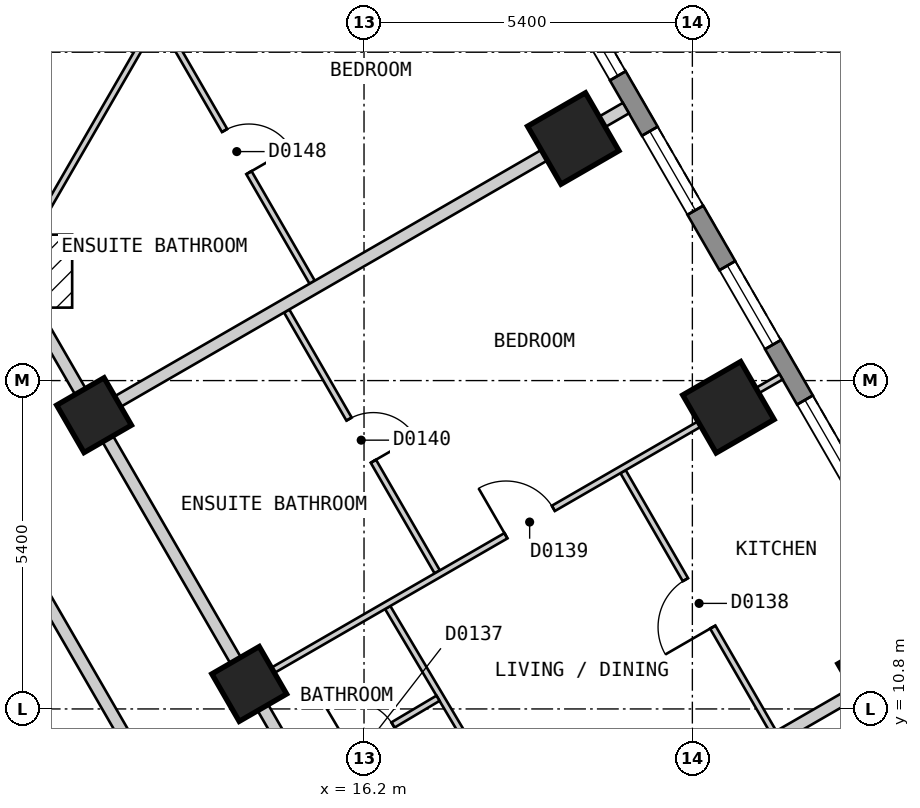
"""IFC4 building model, lengths in metres.
Left out: names, types, materials, properties, quantities, classifications, styles, units other than length and angle.
Written with IfcOpenShell. Run it as: python <this file> out.ifc"""

import sys

from ifc_helpers import new_model, si_unit, direction, frame, frame_2d, origin, origin_2d, place, context, subcontext, project, spatial, polyline, rectangle, outline, extrude, element, fill, save


model = new_model("IFC4")
c1 = context("Model", 3, precision=1e-05, world=origin(), true_north=direction((0.0, 1.0)))
c2 = subcontext(c1, "Body", "Model", "MODEL_VIEW")
j1 = project(units=[si_unit("LENGTHUNIT", "METRE"), si_unit("PLANEANGLEUNIT", "RADIAN")], contexts=[c1])
p1 = place(None, origin())
s1 = spatial("IfcSite", under=j1, at=p1, CompositionType="ELEMENT")
p2 = place(p1, origin())
s2 = spatial("IfcBuilding", under=s1, at=p2, CompositionType="ELEMENT")
p3 = place(p2, frame((0.0, 0.0, 23.4)))
s3 = spatial("IfcBuildingStorey", under=s2, at=p3, CompositionType="ELEMENT", Elevation=23.4)
for number, where, z_axis, x_axis in (
    (1, (24.745, 11.341, 0.0), (0.0, 0.0, 1.0), (-0.5, 0.866, 0.0)),
    (2, (22.193, 15.761, 0.0), (0.0, 0.0, 1.0), (-0.5, 0.866, 0.0)),
    (3, (19.641, 20.181, 0.0), (0.0, 0.0, 1.0), (-0.5, 0.866, 0.0)),
):
    element("IfcColumn", number, at=place(p3, frame(where, z_axis=z_axis, x_axis=x_axis)), inside=s3, PredefinedType="COLUMN", context=c2, shape_type="SweptSolid", body=[
        extrude(rectangle(XDim=1.1, YDim=1.1, at=origin_2d()), origin(), (0.0, 0.0, 1.0), 3.0),
    ])
for number, where, z_axis, x_axis in (
    (4, (14.312, 11.211, 0.0), (0.0, 0.0, 1.0), (-0.5, 0.866, 0.0)),
    (5, (11.76, 15.631, 0.0), (0.0, 0.0, 1.0), (-0.5, 0.866, 0.0)),
):
    element("IfcColumn", number, at=place(p3, frame(where, z_axis=z_axis, x_axis=x_axis)), inside=s3, PredefinedType="COLUMN", context=c2, shape_type="SweptSolid", body=[
        extrude(rectangle(XDim=0.9, YDim=0.9, at=origin_2d()), origin(), (0.0, 0.0, 1.0), 3.0),
    ])
p4 = place(p3, frame((31.22, 2.425, 0.0), z_axis=(0.0, 0.0, 1.0), x_axis=(-0.500001938803, 0.866024284413, 0.0)))
e6 = element("IfcWall", 6, at=p4, inside=s3, PredefinedType="SOLIDWALL", context=c2, shape_type="SweptSolid", body=[
    extrude(outline(polyline([(0.0, -0.15), (27.02, -0.15), (26.94, 0.15), (0.08, 0.15), (0.0, -0.15)])), origin(), (0.0, 0.0, 1.0), 2.7),
])
p5 = place(p4, frame((1.277, 0.0, 0.15)))
e7 = element("IfcOpeningElement", 7, at=p5, cuts=e6, PredefinedType="OPENING", context=c2, shape_type="SweptSolid", body=[
    extrude(rectangle(XDim=1.5, YDim=2.1, at=frame_2d((0.75, 1.05))), frame((0.0, 0.16, 0.0), z_axis=(0.0, -1.0, 0.0), x_axis=(1.0, 0.0, 0.0)), (0.0, 0.0, 1.0), 0.32),
])
p6 = place(p4, frame((3.829, 0.0, 0.15)))
e8 = element("IfcOpeningElement", 8, at=p6, cuts=e6, PredefinedType="OPENING", context=c2, shape_type="SweptSolid", body=[
    extrude(rectangle(XDim=1.5, YDim=2.1, at=frame_2d((0.75, 1.05))), frame((0.0, 0.16, 0.0), z_axis=(0.0, -1.0, 0.0), x_axis=(1.0, 0.0, 0.0)), (0.0, 0.0, 1.0), 0.32),
])
p7 = place(p4, frame((6.382, 0.0, 0.15)))
e9 = element("IfcOpeningElement", 9, at=p7, cuts=e6, PredefinedType="OPENING", context=c2, shape_type="SweptSolid", body=[
    extrude(rectangle(XDim=1.5, YDim=2.1, at=frame_2d((0.75, 1.05))), frame((0.0, 0.16, 0.0), z_axis=(0.0, -1.0, 0.0), x_axis=(1.0, 0.0, 0.0)), (0.0, 0.0, 1.0), 0.32),
])
p8 = place(p4, frame((8.933, 0.0, 0.15)))
e10 = element("IfcOpeningElement", 10, at=p8, cuts=e6, PredefinedType="OPENING", context=c2, shape_type="SweptSolid", body=[
    extrude(rectangle(XDim=1.5, YDim=2.1, at=frame_2d((0.75, 1.05))), frame((0.0, 0.16, 0.0), z_axis=(0.0, -1.0, 0.0), x_axis=(1.0, 0.0, 0.0)), (0.0, 0.0, 1.0), 0.32),
])
p9 = place(p4, frame((11.485, 0.0, 0.15)))
e11 = element("IfcOpeningElement", 11, at=p9, cuts=e6, PredefinedType="OPENING", context=c2, shape_type="SweptSolid", body=[
    extrude(rectangle(XDim=1.5, YDim=2.1, at=frame_2d((0.75, 1.05))), frame((0.0, 0.16, 0.0), z_axis=(0.0, -1.0, 0.0), x_axis=(1.0, 0.0, 0.0)), (0.0, 0.0, 1.0), 0.32),
])
p10 = place(p4, frame((14.037, 0.0, 0.15)))
e12 = element("IfcOpeningElement", 12, at=p10, cuts=e6, PredefinedType="OPENING", context=c2, shape_type="SweptSolid", body=[
    extrude(rectangle(XDim=1.5, YDim=2.1, at=frame_2d((0.75, 1.05))), frame((0.0, 0.16, 0.0), z_axis=(0.0, -1.0, 0.0), x_axis=(1.0, 0.0, 0.0)), (0.0, 0.0, 1.0), 0.32),
])
p11 = place(p4, frame((16.589, 0.0, 0.15)))
e13 = element("IfcOpeningElement", 13, at=p11, cuts=e6, PredefinedType="OPENING", context=c2, shape_type="SweptSolid", body=[
    extrude(rectangle(XDim=1.5, YDim=2.1, at=frame_2d((0.75, 1.05))), frame((0.0, 0.16, 0.0), z_axis=(0.0, -1.0, 0.0), x_axis=(1.0, 0.0, 0.0)), (0.0, 0.0, 1.0), 0.32),
])
p12 = place(p4, frame((19.141, 0.0, 0.15)))
e14 = element("IfcOpeningElement", 14, at=p12, cuts=e6, PredefinedType="OPENING", context=c2, shape_type="SweptSolid", body=[
    extrude(rectangle(XDim=1.5, YDim=2.1, at=frame_2d((0.75, 1.05))), frame((0.0, 0.16, 0.0), z_axis=(0.0, -1.0, 0.0), x_axis=(1.0, 0.0, 0.0)), (0.0, 0.0, 1.0), 0.32),
])
p13 = place(p4, frame((21.693, 0.0, 0.15)))
e15 = element("IfcOpeningElement", 15, at=p13, cuts=e6, PredefinedType="OPENING", context=c2, shape_type="SweptSolid", body=[
    extrude(rectangle(XDim=1.5, YDim=2.1, at=frame_2d((0.75, 1.05))), frame((0.0, 0.16, 0.0), z_axis=(0.0, -1.0, 0.0), x_axis=(1.0, 0.0, 0.0)), (0.0, 0.0, 1.0), 0.32),
])
p14 = place(p4, frame((24.244, 0.0, 0.15)))
e16 = element("IfcOpeningElement", 16, at=p14, cuts=e6, PredefinedType="OPENING", context=c2, shape_type="SweptSolid", body=[
    extrude(rectangle(XDim=1.5, YDim=2.1, at=frame_2d((0.75, 1.05))), frame((0.0, 0.16, 0.0), z_axis=(0.0, -1.0, 0.0), x_axis=(1.0, 0.0, 0.0)), (0.0, 0.0, 1.0), 0.32),
])
p15 = place(p3, frame((9.18, 15.7, 0.0), z_axis=(0.0, 0.0, 1.0), x_axis=(0.500003652032, -0.866023295272, 0.0)))
e17 = element("IfcWall", 17, at=p15, inside=s3, PredefinedType="PARTITIONING", context=c2, shape_type="SweptSolid", body=[
    extrude(rectangle(XDim=18.012, YDim=0.2, at=frame_2d((9.006, 0.0))), origin(), (0.0, 0.0, 1.0), 2.7),
])
p16 = place(p15, frame((8.556, 0.0, 0.0)))
e18 = element("IfcOpeningElement", 18, at=p16, cuts=e17, PredefinedType="OPENING", context=c2, shape_type="SweptSolid", body=[
    extrude(rectangle(XDim=0.9, YDim=2.1, at=frame_2d((0.45, 1.05))), frame((0.0, 0.11, 0.0), z_axis=(0.0, -1.0, 0.0), x_axis=(1.0, 0.0, 0.0)), (0.0, 0.0, 1.0), 0.22),
])
p17 = place(p3, frame((10.45, 17.9, 0.0), z_axis=(0.0, 0.0, 1.0), x_axis=(0.500034352617, -0.866005569383, 0.0)))
e19 = element("IfcWall", 19, at=p17, inside=s3, PredefinedType="PARTITIONING", context=c2, shape_type="SweptSolid", body=[
    extrude(rectangle(XDim=20.553, YDim=0.2, at=frame_2d((10.276, 0.0))), origin(), (0.0, 0.0, 1.0), 2.7),
])
p18 = place(p17, frame((14.903, 0.0, 0.0)))
e20 = element("IfcOpeningElement", 20, at=p18, cuts=e19, PredefinedType="OPENING", context=c2, shape_type="SweptSolid", body=[
    extrude(rectangle(XDim=1.0, YDim=2.1, at=frame_2d((0.5, 1.05))), frame((0.0, 0.11, 0.0), z_axis=(0.0, -1.0, 0.0), x_axis=(1.0, 0.0, 0.0)), (0.0, 0.0, 1.0), 0.22),
])
p19 = place(p17, frame((9.775, 0.0, 0.0)))
e21 = element("IfcOpeningElement", 21, at=p19, cuts=e19, PredefinedType="OPENING", context=c2, shape_type="SweptSolid", body=[
    extrude(rectangle(XDim=1.0, YDim=2.1, at=frame_2d((0.5, 1.05))), frame((0.0, 0.11, 0.0), z_axis=(0.0, -1.0, 0.0), x_axis=(1.0, 0.0, 0.0)), (0.0, 0.0, 1.0), 0.22),
])
p20 = place(p3, frame((16.589, 12.468, 0.0), z_axis=(0.0, 0.0, 1.0), x_axis=(0.510331599186, -0.859977708358, 0.0)))
e22 = element("IfcWall", 22, at=p20, inside=s3, PredefinedType="PARTITIONING", context=c2, shape_type="SweptSolid", body=[
    extrude(rectangle(XDim=3.186, YDim=0.1, at=frame_2d((1.593, 0.0))), origin(), (0.0, 0.0, 1.0), 2.7),
])
p21 = place(p3, frame((14.928, 17.344, 0.0), z_axis=(0.0, 0.0, 1.0), x_axis=(0.499881743012, -0.866093668724, 0.0)))
e23 = element("IfcWall", 23, at=p21, inside=s3, PredefinedType="PARTITIONING", context=c2, shape_type="SweptSolid", body=[
    extrude(rectangle(XDim=4.953, YDim=0.1, at=frame_2d((2.477, 0.0))), origin(), (0.0, 0.0, 1.0), 2.7),
])
p22 = place(p21, frame((2.052, 0.0, 0.0)))
e24 = element("IfcOpeningElement", 24, at=p22, cuts=e23, PredefinedType="OPENING", context=c2, shape_type="SweptSolid", body=[
    extrude(rectangle(XDim=0.8, YDim=2.1, at=frame_2d((0.4, 1.05))), frame((0.0, 0.06, 0.0), z_axis=(0.0, -1.0, 0.0), x_axis=(1.0, 0.0, 0.0)), (0.0, 0.0, 1.0), 0.12),
])
p23 = place(p3, frame((12.846, 22.15, 0.0), z_axis=(0.0, 0.0, 1.0), x_axis=(0.500002715276, -0.866023836113, 0.0)))
e25 = element("IfcWall", 25, at=p23, inside=s3, PredefinedType="PARTITIONING", context=c2, shape_type="SweptSolid", body=[
    extrude(rectangle(XDim=5.002, YDim=0.1, at=frame_2d((2.501, 0.0))), origin(), (0.0, 0.0, 1.0), 2.7),
])
p24 = place(p23, frame((2.122, 0.0, 0.0)))
e26 = element("IfcOpeningElement", 26, at=p24, cuts=e25, PredefinedType="OPENING", context=c2, shape_type="SweptSolid", body=[
    extrude(rectangle(XDim=0.8, YDim=2.1, at=frame_2d((0.4, 1.05))), frame((0.0, 0.06, 0.0), z_axis=(0.0, -1.0, 0.0), x_axis=(1.0, 0.0, 0.0)), (0.0, 0.0, 1.0), 0.12),
])
p25 = place(p3, frame((20.46, 14.703, 0.0), z_axis=(0.0, 0.0, 1.0), x_axis=(0.499903082856, -0.866081351693, 0.0)))
e27 = element("IfcWall", 27, at=p25, inside=s3, PredefinedType="PARTITIONING", context=c2, shape_type="SweptSolid", body=[
    extrude(rectangle(XDim=4.953, YDim=0.1, at=frame_2d((2.477, 0.0))), origin(), (0.0, 0.0, 1.0), 2.7),
])
p26 = place(p25, frame((2.052, 0.0, 0.0)))
e28 = element("IfcOpeningElement", 28, at=p26, cuts=e27, PredefinedType="OPENING", context=c2, shape_type="SweptSolid", body=[
    extrude(rectangle(XDim=0.9, YDim=2.1, at=frame_2d((0.45, 1.05))), frame((0.0, 0.06, 0.0), z_axis=(0.0, -1.0, 0.0), x_axis=(1.0, 0.0, 0.0)), (0.0, 0.0, 1.0), 0.12),
])
p27 = place(p3, frame((10.393, 18.0, 0.0), z_axis=(0.0, 0.0, 1.0), x_axis=(0.499945497007, 0.866056868816, 0.0)))
e29 = element("IfcWall", 29, at=p27, inside=s3, PredefinedType="PARTITIONING", context=c2, shape_type="SweptSolid", body=[
    extrude(rectangle(XDim=10.265, YDim=0.1, at=frame_2d((5.132, 0.0))), origin(), (0.0, 0.0, 1.0), 2.7),
])
p28 = place(p27, frame((7.108, 0.0, 0.0)))
e30 = element("IfcOpeningElement", 30, at=p28, cuts=e29, PredefinedType="OPENING", context=c2, shape_type="SweptSolid", body=[
    extrude(rectangle(XDim=0.9, YDim=2.1, at=frame_2d((0.45, 1.05))), frame((0.0, 0.06, 0.0), z_axis=(0.0, -1.0, 0.0), x_axis=(1.0, 0.0, 0.0)), (0.0, 0.0, 1.0), 0.12),
])
p29 = place(p3, frame((14.399, 11.261, 0.0), z_axis=(0.0, 0.0, 1.0), x_axis=(0.866022959057, 0.500004234368, 0.0)))
e31 = element("IfcWall", 31, at=p29, inside=s3, PredefinedType="PARTITIONING", context=c2, shape_type="SweptSolid", body=[
    extrude(rectangle(XDim=10.0, YDim=0.1, at=frame_2d((5.0, 0.0))), origin(), (0.0, 0.0, 1.0), 2.7),
])
p30 = place(p29, frame((4.775, 0.0, 0.0)))
e32 = element("IfcOpeningElement", 32, at=p30, cuts=e31, PredefinedType="OPENING", context=c2, shape_type="SweptSolid", body=[
    extrude(rectangle(XDim=0.9, YDim=2.1, at=frame_2d((0.45, 1.05))), frame((0.0, 0.06, 0.0), z_axis=(0.0, -1.0, 0.0), x_axis=(1.0, 0.0, 0.0)), (0.0, 0.0, 1.0), 0.12),
])
p31 = place(p3, frame((15.291, 9.715, 0.0), z_axis=(0.0, 0.0, 1.0), x_axis=(0.860087708271, 0.510146188932, 0.0)))
e33 = element("IfcWall", 33, at=p31, inside=s3, PredefinedType="PARTITIONING", context=c2, shape_type="SweptSolid", body=[
    extrude(rectangle(XDim=2.472, YDim=0.1, at=frame_2d((1.236, 0.0))), origin(), (0.0, 0.0, 1.0), 2.7),
])
p32 = place(p31, frame((0.81, 0.0, 0.0)))
e34 = element("IfcOpeningElement", 34, at=p32, cuts=e33, PredefinedType="OPENING", context=c2, shape_type="SweptSolid", body=[
    extrude(rectangle(XDim=0.8, YDim=2.1, at=frame_2d((0.4, 1.05))), frame((0.0, 0.06, 0.0), z_axis=(0.0, -1.0, 0.0), x_axis=(1.0, 0.0, 0.0)), (0.0, 0.0, 1.0), 0.12),
])
for number, where, z_axis, x_axis in (
    (35, (16.95, 6.841, 0.0), (0.0, 0.0, 1.0), (0.866, 0.5, 0.0)),
    (36, (11.847, 15.681, 0.0), (0.0, 0.0, 1.0), (0.866, 0.5, 0.0)),
):
    element("IfcWall", number, at=place(p3, frame(where, z_axis=z_axis, x_axis=x_axis)), inside=s3, PredefinedType="PARTITIONING", context=c2, shape_type="SweptSolid", body=[
        extrude(rectangle(XDim=10.0, YDim=0.2, at=frame_2d((5.0, 0.0))), origin(), (0.0, 0.0, 1.0), 2.7),
    ])
p33 = place(p10, origin())
e37 = element("IfcWindow", 37, at=p33, inside=s3, PartitioningType="SINGLE_PANEL", PredefinedType="WINDOW", context=c2, shape_type="SweptSolid", body=[
    extrude(rectangle(XDim=1.5, YDim=2.1, at=frame_2d((0.75, 1.05))), frame((0.0, 0.03, 0.0), z_axis=(0.0, -1.0, 0.0), x_axis=(1.0, 0.0, 0.0)), (0.0, 0.0, 1.0), 0.06),
])
fill(e12, e37)
p34 = place(p11, origin())
e38 = element("IfcWindow", 38, at=p34, inside=s3, PartitioningType="SINGLE_PANEL", PredefinedType="WINDOW", context=c2, shape_type="SweptSolid", body=[
    extrude(rectangle(XDim=1.5, YDim=2.1, at=frame_2d((0.75, 1.05))), frame((0.0, 0.03, 0.0), z_axis=(0.0, -1.0, 0.0), x_axis=(1.0, 0.0, 0.0)), (0.0, 0.0, 1.0), 0.06),
])
fill(e13, e38)
p35 = place(p12, origin())
e39 = element("IfcWindow", 39, at=p35, inside=s3, PartitioningType="SINGLE_PANEL", PredefinedType="WINDOW", context=c2, shape_type="SweptSolid", body=[
    extrude(rectangle(XDim=1.5, YDim=2.1, at=frame_2d((0.75, 1.05))), frame((0.0, 0.03, 0.0), z_axis=(0.0, -1.0, 0.0), x_axis=(1.0, 0.0, 0.0)), (0.0, 0.0, 1.0), 0.06),
])
fill(e14, e39)
p36 = place(p13, origin())
e40 = element("IfcWindow", 40, at=p36, inside=s3, PartitioningType="SINGLE_PANEL", PredefinedType="WINDOW", context=c2, shape_type="SweptSolid", body=[
    extrude(rectangle(XDim=1.5, YDim=2.1, at=frame_2d((0.75, 1.05))), frame((0.0, 0.03, 0.0), z_axis=(0.0, -1.0, 0.0), x_axis=(1.0, 0.0, 0.0)), (0.0, 0.0, 1.0), 0.06),
])
fill(e15, e40)
p37 = place(p32, origin())
e41 = element("IfcDoor", 41, at=p37, inside=s3, OperationType="SINGLE_SWING_LEFT", PredefinedType="DOOR", context=c2, shape_type="SweptSolid", body=[
    extrude(rectangle(XDim=0.8, YDim=2.1, at=frame_2d((0.4, 1.05))), frame((0.0, 0.025, 0.0), z_axis=(0.0, -1.0, 0.0), x_axis=(1.0, 0.0, 0.0)), (0.0, 0.0, 1.0), 0.05),
])
fill(e34, e41)
p38 = place(p26, origin())
e42 = element("IfcDoor", 42, at=p38, inside=s3, OperationType="SINGLE_SWING_RIGHT", PredefinedType="DOOR", context=c2, shape_type="SweptSolid", body=[
    extrude(rectangle(XDim=0.9, YDim=2.1, at=frame_2d((0.45, 1.05))), frame((0.0, 0.025, 0.0), z_axis=(0.0, -1.0, 0.0), x_axis=(1.0, 0.0, 0.0)), (0.0, 0.0, 1.0), 0.05),
])
fill(e28, e42)
p39 = place(p30, origin())
e43 = element("IfcDoor", 43, at=p39, inside=s3, OperationType="SINGLE_SWING_LEFT", PredefinedType="DOOR", context=c2, shape_type="SweptSolid", body=[
    extrude(rectangle(XDim=0.9, YDim=2.1, at=frame_2d((0.45, 1.05))), frame((0.0, 0.025, 0.0), z_axis=(0.0, -1.0, 0.0), x_axis=(1.0, 0.0, 0.0)), (0.0, 0.0, 1.0), 0.05),
])
fill(e32, e43)
p40 = place(p22, origin())
e44 = element("IfcDoor", 44, at=p40, inside=s3, OperationType="SINGLE_SWING_RIGHT", PredefinedType="DOOR", context=c2, shape_type="SweptSolid", body=[
    extrude(rectangle(XDim=0.8, YDim=2.1, at=frame_2d((0.4, 1.05))), frame((0.0, 0.025, 0.0), z_axis=(0.0, -1.0, 0.0), x_axis=(1.0, 0.0, 0.0)), (0.0, 0.0, 1.0), 0.05),
])
fill(e24, e44)
p41 = place(p24, origin())
e45 = element("IfcDoor", 45, at=p41, inside=s3, OperationType="SINGLE_SWING_RIGHT", PredefinedType="DOOR", context=c2, shape_type="SweptSolid", body=[
    extrude(rectangle(XDim=0.8, YDim=2.1, at=frame_2d((0.4, 1.05))), frame((0.0, 0.025, 0.0), z_axis=(0.0, -1.0, 0.0), x_axis=(1.0, 0.0, 0.0)), (0.0, 0.0, 1.0), 0.05),
])
fill(e26, e45)
save(model, sys.argv[1])
